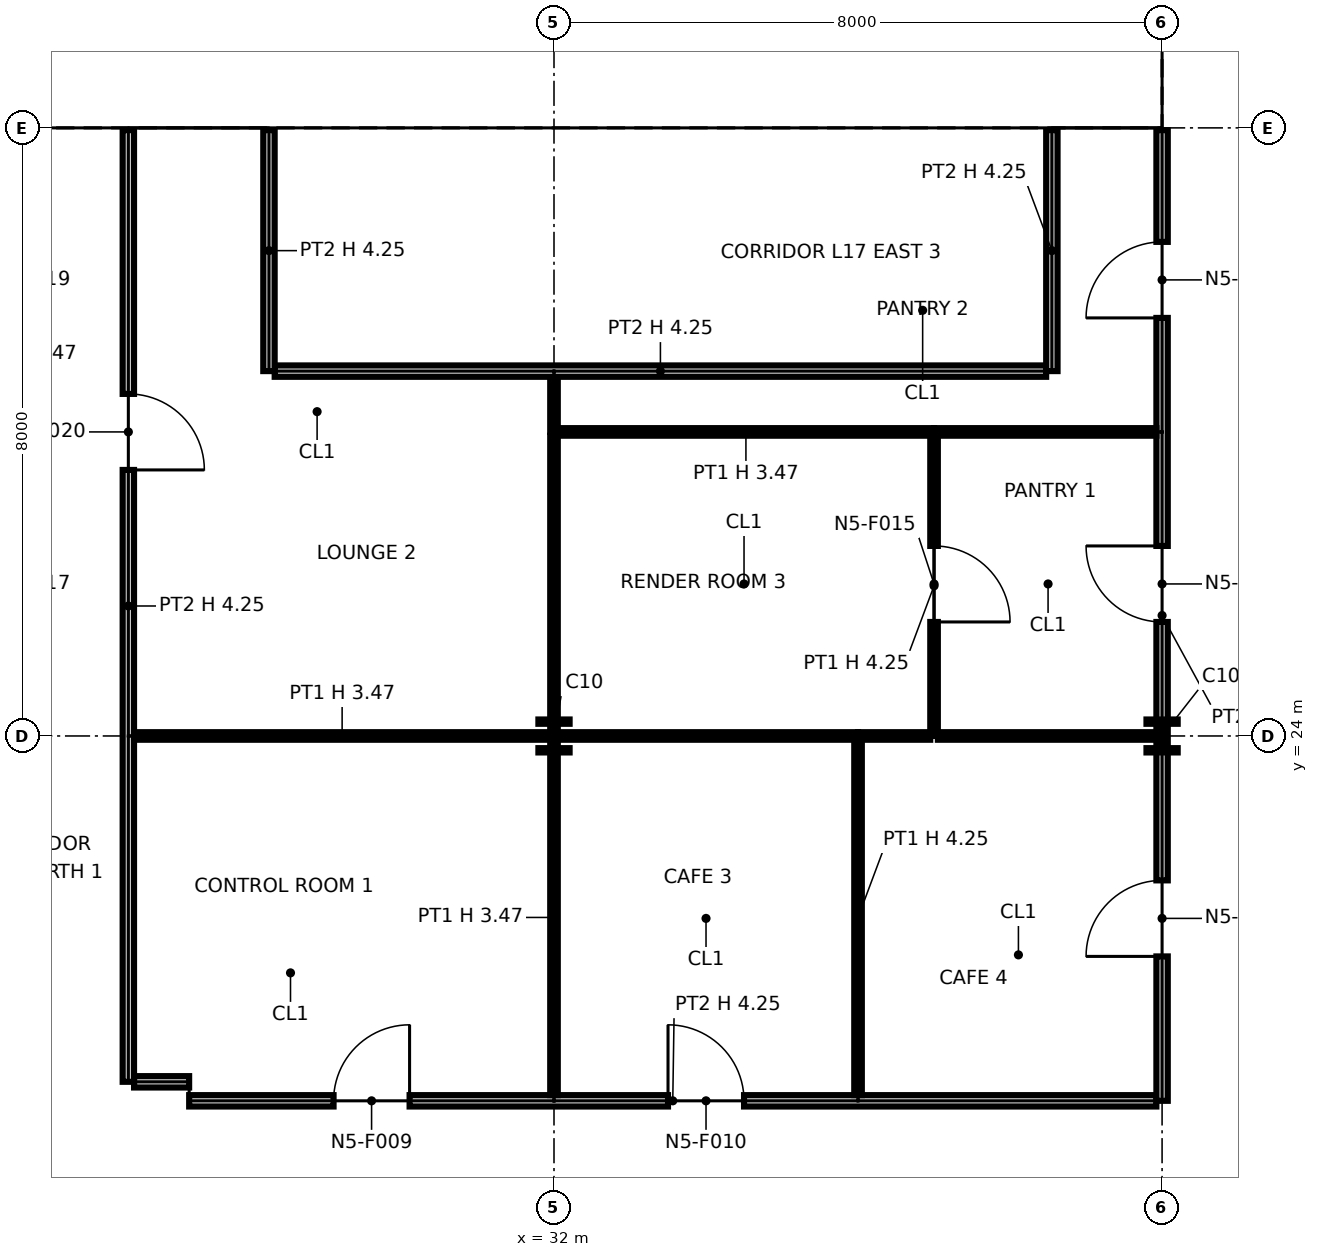
"""IFC4 building model, lengths in metres.
Left out: names, types, materials, properties, quantities, classifications, styles, units other than length and angle.
Written with IfcOpenShell. Run it as: python <this file> out.ifc"""

import sys

from ifc_helpers import new_model, si_unit, direction, frame, frame_2d, origin, origin_2d, place, context, subcontext, project, spatial, polyline, rectangle, i_section, outline, extrude, element, fill, save


model = new_model("IFC4")
c1 = context("Model", 3, precision=1e-05, world=origin(), true_north=direction((0.0, 1.0)))
c2 = subcontext(c1, "Body", "Model", "MODEL_VIEW")
j1 = project(units=[si_unit("LENGTHUNIT", "METRE"), si_unit("PLANEANGLEUNIT", "RADIAN")], contexts=[c1])
p1 = place(None, origin())
s1 = spatial("IfcSite", under=j1, at=p1, CompositionType="ELEMENT")
p2 = place(p1, origin())
s2 = spatial("IfcBuilding", under=s1, at=p2, CompositionType="ELEMENT")
p3 = place(p2, frame((0.0, 0.0, 92.0)))
s3 = spatial("IfcBuildingStorey", under=s2, at=p3, CompositionType="ELEMENT", Elevation=92.0)
p4 = place(p3, frame((32.0, 24.0, 0.0), z_axis=(0.0, 0.0, 1.0), x_axis=(1.0, 0.0, 0.0)))
e1 = element("IfcColumn", 1, at=p4, inside=s3, PredefinedType="COLUMN", context=c2, shape_type="SweptSolid", body=[
    extrude(i_section(OverallWidth=0.411, OverallDepth=0.434, WebThickness=0.036, FlangeThickness=0.057, at=origin_2d()), origin(), (0.0, 0.0, 1.0), 4.25),
])
p5 = place(p3, frame((32.0, 32.0, 0.0), z_axis=(0.0, 0.0, 1.0), x_axis=(1.0, 0.0, 0.0)))
e2 = element("IfcColumn", 2, at=p5, inside=s3, PredefinedType="COLUMN", context=c2, shape_type="SweptSolid", body=[
    extrude(i_section(OverallWidth=0.257, OverallDepth=0.363, WebThickness=0.013, FlangeThickness=0.022, at=origin_2d()), origin(), (0.0, 0.0, 1.0), 4.25),
])
p6 = place(p3, frame((40.0, 24.0, 0.0), z_axis=(0.0, 0.0, 1.0), x_axis=(1.0, 0.0, 0.0)))
e3 = element("IfcColumn", 3, at=p6, inside=s3, PredefinedType="COLUMN", context=c2, shape_type="SweptSolid", body=[
    extrude(i_section(OverallWidth=0.411, OverallDepth=0.434, WebThickness=0.036, FlangeThickness=0.057, at=origin_2d()), origin(), (0.0, 0.0, 1.0), 4.25),
])
p7 = place(p3, frame((40.0, 32.0, 0.0), z_axis=(0.0, 0.0, 1.0), x_axis=(1.0, 0.0, 0.0)))
e4 = element("IfcColumn", 4, at=p7, inside=s3, PredefinedType="COLUMN", context=c2, shape_type="SweptSolid", body=[
    extrude(i_section(OverallWidth=0.257, OverallDepth=0.363, WebThickness=0.013, FlangeThickness=0.022, at=origin_2d()), origin(), (0.0, 0.0, 1.0), 4.25),
])
p8 = place(p3, frame((24.65, 32.75, 0.0), z_axis=(0.0, 0.0, 1.0), x_axis=(1.0, 0.0, 0.0)))
e5 = element("IfcWall", 5, at=p8, inside=s3, PredefinedType="PARTITIONING", context=c2, shape_type="SweptSolid", body=[
    extrude(outline(polyline([(0.0, 0.0), (14.7, 0.0), (14.7, 4.25), (7.469, 4.25), (7.469, 3.632), (7.231, 3.632), (7.23, 4.25), (0.0, 4.25), (0.0, 0.0)])), frame((0.0, 0.1, 0.0), z_axis=(0.0, -1.0, 0.0), x_axis=(1.0, 0.0, 0.0)), (0.0, 0.0, 1.0), 0.2),
])
p9 = place(p8, frame((4.1, 0.0, 0.0)))
e6 = element("IfcOpeningElement", 6, at=p9, cuts=e5, PredefinedType="OPENING", context=c2, shape_type="SweptSolid", body=[
    extrude(rectangle(XDim=1.8, YDim=2.1, at=frame_2d((0.9, 1.05))), frame((0.0, 0.11, 0.0), z_axis=(0.0, -1.0, 0.0), x_axis=(1.0, 0.0, 0.0)), (0.0, 0.0, 1.0), 0.22),
])
p10 = place(p8, frame((8.55, 0.0, 0.0)))
e7 = element("IfcOpeningElement", 7, at=p10, cuts=e5, PredefinedType="OPENING", context=c2, shape_type="SweptSolid", body=[
    extrude(rectangle(XDim=1.4, YDim=2.1, at=frame_2d((0.7, 1.05))), frame((0.0, 0.11, 0.0), z_axis=(0.0, -1.0, 0.0), x_axis=(1.0, 0.0, 0.0)), (0.0, 0.0, 1.0), 0.22),
])
p11 = place(p8, frame((12.0, 0.0, 0.0)))
e8 = element("IfcOpeningElement", 8, at=p11, cuts=e5, PredefinedType="OPENING", context=c2, shape_type="SweptSolid", body=[
    extrude(rectangle(XDim=1.4, YDim=2.1, at=frame_2d((0.7, 1.05))), frame((0.0, 0.11, 0.0), z_axis=(0.0, -1.0, 0.0), x_axis=(1.0, 0.0, 0.0)), (0.0, 0.0, 1.0), 0.22),
])
p12 = place(p3, frame((26.875, 32.85, 0.0), z_axis=(0.0, 0.0, 1.0), x_axis=(0.0, 1.0, 0.0)))
e9 = element("IfcWall", 9, at=p12, inside=s3, PredefinedType="PARTITIONING", context=c2, shape_type="SweptSolid", body=[
    extrude(rectangle(XDim=2.15, YDim=0.15, at=frame_2d((1.075, 0.0))), origin(), (0.0, 0.0, 1.0), 4.25),
])
p13 = place(p12, frame((0.6, 0.0, 0.0)))
e10 = element("IfcOpeningElement", 10, at=p13, cuts=e9, PredefinedType="OPENING", context=c2, shape_type="SweptSolid", body=[
    extrude(rectangle(XDim=0.9, YDim=2.1, at=frame_2d((0.45, 1.05))), frame((0.0, 0.085, 0.0), z_axis=(0.0, -1.0, 0.0), x_axis=(1.0, 0.0, 0.0)), (0.0, 0.0, 1.0), 0.17),
])
p14 = place(p3, frame((32.0, 32.85, 0.0), z_axis=(0.0, 0.0, 1.0), x_axis=(0.0, 1.0, 0.0)))
e11 = element("IfcWall", 11, at=p14, inside=s3, PredefinedType="PARTITIONING", context=c2, shape_type="SweptSolid", body=[
    extrude(rectangle(XDim=6.3, YDim=0.6, at=frame_2d((3.15, 0.0))), origin(), (0.0, 0.0, 1.0), 3.632),
])
for number, where, z_axis, x_axis in (
    (12, (35.6, 32.85, 0.0), (0.0, 0.0, 1.0), (0.0, 1.0, 0.0)),
    (13, (39.25, 32.85, 0.0), (0.0, 0.0, 1.0), (0.0, 1.0, 0.0)),
):
    element("IfcWall", number, at=place(p3, frame(where, z_axis=z_axis, x_axis=x_axis)), inside=s3, PredefinedType="PARTITIONING", context=c2, shape_type="SweptSolid", body=[
        extrude(rectangle(XDim=6.3, YDim=0.2, at=frame_2d((3.15, 0.0))), origin(), (0.0, 0.0, 1.0), 4.25),
    ])
p15 = place(p3, frame((27.2, 19.2, 0.0), z_axis=(0.0, 0.0, 1.0), x_axis=(1.0, 0.0, 0.0)))
e14 = element("IfcWall", 14, at=p15, inside=s3, PredefinedType="PARTITIONING", context=c2, shape_type="SweptSolid", body=[
    extrude(rectangle(XDim=12.725, YDim=0.15, at=frame_2d((6.363, 0.0))), origin(), (0.0, 0.0, 1.0), 4.25),
])
p16 = place(p15, frame((1.9, 0.0, 0.0)))
e15 = element("IfcOpeningElement", 15, at=p16, cuts=e14, PredefinedType="OPENING", context=c2, shape_type="SweptSolid", body=[
    extrude(rectangle(XDim=1.0, YDim=2.1, at=frame_2d((0.5, 1.05))), frame((0.0, 0.085, 0.0), z_axis=(0.0, -1.0, 0.0), x_axis=(1.0, 0.0, 0.0)), (0.0, 0.0, 1.0), 0.17),
])
p17 = place(p15, frame((6.3, 0.0, 0.0)))
e16 = element("IfcOpeningElement", 16, at=p17, cuts=e14, PredefinedType="OPENING", context=c2, shape_type="SweptSolid", body=[
    extrude(rectangle(XDim=1.0, YDim=2.1, at=frame_2d((0.5, 1.05))), frame((0.0, 0.085, 0.0), z_axis=(0.0, -1.0, 0.0), x_axis=(1.0, 0.0, 0.0)), (0.0, 0.0, 1.0), 0.17),
])
p18 = place(p3, frame((32.0, 19.275, 0.0), z_axis=(0.0, 0.0, 1.0), x_axis=(0.0, 1.0, 0.0)))
e17 = element("IfcWall", 17, at=p18, inside=s3, PredefinedType="PARTITIONING", context=c2, shape_type="SweptSolid", body=[
    extrude(rectangle(XDim=4.675, YDim=0.1, at=frame_2d((2.337, 0.0))), origin(), (0.0, 0.0, 1.0), 3.47),
])
p19 = place(p3, frame((36.0, 19.275, 0.0), z_axis=(0.0, 0.0, 1.0), x_axis=(0.0, 1.0, 0.0)))
e18 = element("IfcWall", 18, at=p19, inside=s3, PredefinedType="PARTITIONING", context=c2, shape_type="SweptSolid", body=[
    extrude(outline(polyline([(0.0, 0.0), (4.675, 0.0), (4.675, 4.25), (1.025, 4.25), (1.023, 3.47), (0.427, 3.47), (0.425, 4.25), (0.0, 4.25), (0.0, 0.0)])), frame((0.0, 0.05, 0.0), z_axis=(0.0, -1.0, 0.0), x_axis=(1.0, 0.0, 0.0)), (0.0, 0.0, 1.0), 0.1),
])
p20 = place(p3, frame((40.0, 19.2, 0.0), z_axis=(0.0, 0.0, 1.0), x_axis=(0.0, 1.0, 0.0)))
e19 = element("IfcWall", 19, at=p20, inside=s3, PredefinedType="PARTITIONING", context=c2, shape_type="SweptSolid", body=[
    extrude(rectangle(XDim=12.77, YDim=0.15, at=frame_2d((6.385, 0.0))), origin(), (0.0, 0.0, 1.0), 3.47),
])
p21 = place(p20, frame((1.9, 0.0, 0.0)))
e20 = element("IfcOpeningElement", 20, at=p21, cuts=e19, PredefinedType="OPENING", context=c2, shape_type="SweptSolid", body=[
    extrude(rectangle(XDim=1.0, YDim=2.1, at=frame_2d((0.5, 1.05))), frame((0.0, 0.085, 0.0), z_axis=(0.0, -1.0, 0.0), x_axis=(1.0, 0.0, 0.0)), (0.0, 0.0, 1.0), 0.17),
])
p22 = place(p20, frame((6.3, 0.0, 0.0)))
e21 = element("IfcOpeningElement", 21, at=p22, cuts=e19, PredefinedType="OPENING", context=c2, shape_type="SweptSolid", body=[
    extrude(rectangle(XDim=1.0, YDim=2.1, at=frame_2d((0.5, 1.05))), frame((0.0, 0.085, 0.0), z_axis=(0.0, -1.0, 0.0), x_axis=(1.0, 0.0, 0.0)), (0.0, 0.0, 1.0), 0.17),
])
p23 = place(p20, frame((10.3, 0.0, 0.0)))
e22 = element("IfcOpeningElement", 22, at=p23, cuts=e19, PredefinedType="OPENING", context=c2, shape_type="SweptSolid", body=[
    extrude(rectangle(XDim=1.0, YDim=2.1, at=frame_2d((0.5, 1.05))), frame((0.0, 0.085, 0.0), z_axis=(0.0, -1.0, 0.0), x_axis=(1.0, 0.0, 0.0)), (0.0, 0.0, 1.0), 0.17),
])
p24 = place(p3, frame((26.475, 19.45, 0.0), z_axis=(0.0, 0.0, 1.0), x_axis=(1.0, 0.0, 0.0)))
e23 = element("IfcWall", 23, at=p24, inside=s3, PredefinedType="PARTITIONING", context=c2, shape_type="SweptSolid", body=[
    extrude(rectangle(XDim=0.725, YDim=0.15, at=frame_2d((0.362, 0.0))), origin(), (0.0, 0.0, 1.0), 4.25),
])
p25 = place(p3, frame((26.4, 19.45, 0.0), z_axis=(0.0, 0.0, 1.0), x_axis=(0.0, 1.0, 0.0)))
e24 = element("IfcWall", 24, at=p25, inside=s3, PredefinedType="PARTITIONING", context=c2, shape_type="SweptSolid", body=[
    extrude(outline(polyline([(0.0, 0.0), (12.52, 0.0), (12.52, 4.25), (8.85, 4.25), (8.848, 3.47), (8.252, 3.47), (8.25, 4.25), (4.85, 4.25), (4.848, 3.47), (4.252, 3.47), (4.25, 4.25), (0.85, 4.25), (0.848, 3.47), (0.252, 3.47), (0.25, 4.25), (0.0, 4.25), (0.0, 0.0)])), frame((0.0, 0.075, 0.0), z_axis=(0.0, -1.0, 0.0), x_axis=(1.0, 0.0, 0.0)), (0.0, 0.0, 1.0), 0.15),
])
p26 = place(p25, frame((9.05, 0.0, 0.0), z_axis=(0.0, 0.0, 1.0), x_axis=(-1.0, 0.0, 0.0)))
e25 = element("IfcOpeningElement", 25, at=p26, cuts=e24, PredefinedType="OPENING", context=c2, shape_type="SweptSolid", body=[
    extrude(rectangle(XDim=1.0, YDim=2.1, at=frame_2d((0.5, 1.05))), frame((0.0, 0.085, 0.0), z_axis=(0.0, -1.0, 0.0), x_axis=(1.0, 0.0, 0.0)), (0.0, 0.0, 1.0), 0.17),
])
p27 = place(p3, frame((26.475, 24.0, 0.0), z_axis=(0.0, 0.0, 1.0), x_axis=(1.0, 0.0, 0.0)))
e26 = element("IfcWall", 26, at=p27, inside=s3, PredefinedType="PARTITIONING", context=c2, shape_type="SweptSolid", body=[
    extrude(rectangle(XDim=5.475, YDim=0.1, at=frame_2d((2.737, 0.0))), origin(), (0.0, 0.0, 1.0), 3.47),
])
for number, where, z_axis, x_axis in (
    (27, (32.05, 24.0, 0.0), (0.0, 0.0, 1.0), (1.0, 0.0, 0.0)),
    (28, (32.0, 24.0, 0.0), (0.0, 0.0, 1.0), (0.0, 1.0, 0.0)),
):
    element("IfcWall", number, at=place(p3, frame(where, z_axis=z_axis, x_axis=x_axis)), inside=s3, PredefinedType="PARTITIONING", context=c2, shape_type="SweptSolid", body=[
        extrude(rectangle(XDim=3.95, YDim=0.1, at=frame_2d((1.975, 0.0))), origin(), (0.0, 0.0, 1.0), 3.47),
    ])
p28 = place(p3, frame((36.0, 24.0, 0.0), z_axis=(0.0, 0.0, 1.0), x_axis=(1.0, 0.0, 0.0)))
e29 = element("IfcWall", 29, at=p28, inside=s3, PredefinedType="PARTITIONING", context=c2, shape_type="SweptSolid", body=[
    extrude(rectangle(XDim=0.95, YDim=0.1, at=frame_2d((0.475, 0.0))), origin(), (0.0, 0.0, 1.0), 3.47),
])
p29 = place(p3, frame((37.05, 24.0, 0.0), z_axis=(0.0, 0.0, 1.0), x_axis=(1.0, 0.0, 0.0)))
e30 = element("IfcWall", 30, at=p29, inside=s3, PredefinedType="PARTITIONING", context=c2, shape_type="SweptSolid", body=[
    extrude(rectangle(XDim=2.875, YDim=0.1, at=frame_2d((1.438, 0.0))), origin(), (0.0, 0.0, 1.0), 3.47),
])
p30 = place(p3, frame((37.0, 24.0, 0.0), z_axis=(0.0, 0.0, 1.0), x_axis=(0.0, 1.0, 0.0)))
e31 = element("IfcWall", 31, at=p30, inside=s3, PredefinedType="PARTITIONING", context=c2, shape_type="SweptSolid", body=[
    extrude(rectangle(XDim=3.95, YDim=0.1, at=frame_2d((1.975, 0.0))), origin(), (0.0, 0.0, 1.0), 4.25),
])
p31 = place(p30, frame((2.5, 0.0, 0.0), z_axis=(0.0, 0.0, 1.0), x_axis=(-1.0, 0.0, 0.0)))
e32 = element("IfcOpeningElement", 32, at=p31, cuts=e31, PredefinedType="OPENING", context=c2, shape_type="SweptSolid", body=[
    extrude(rectangle(XDim=1.0, YDim=2.1, at=frame_2d((0.5, 1.05))), frame((0.0, 0.06, 0.0), z_axis=(0.0, -1.0, 0.0), x_axis=(1.0, 0.0, 0.0)), (0.0, 0.0, 1.0), 0.12),
])
p32 = place(p3, frame((32.05, 28.0, 0.0), z_axis=(0.0, 0.0, 1.0), x_axis=(1.0, 0.0, 0.0)))
e33 = element("IfcWall", 33, at=p32, inside=s3, PredefinedType="PARTITIONING", context=c2, shape_type="SweptSolid", body=[
    extrude(rectangle(XDim=4.95, YDim=0.1, at=frame_2d((2.475, 0.0))), origin(), (0.0, 0.0, 1.0), 3.47),
])
p33 = place(p3, frame((32.0, 28.0, 0.0), z_axis=(0.0, 0.0, 1.0), x_axis=(0.0, 1.0, 0.0)))
e34 = element("IfcWall", 34, at=p33, inside=s3, PredefinedType="PARTITIONING", context=c2, shape_type="SweptSolid", body=[
    extrude(rectangle(XDim=0.725, YDim=0.1, at=frame_2d((0.363, 0.0))), origin(), (0.0, 0.0, 1.0), 3.47),
])
p34 = place(p3, frame((37.0, 28.0, 0.0), z_axis=(0.0, 0.0, 1.0), x_axis=(1.0, 0.0, 0.0)))
e35 = element("IfcWall", 35, at=p34, inside=s3, PredefinedType="PARTITIONING", context=c2, shape_type="SweptSolid", body=[
    extrude(rectangle(XDim=2.925, YDim=0.1, at=frame_2d((1.462, 0.0))), origin(), (0.0, 0.0, 1.0), 3.47),
])
p35 = place(p3, frame((28.325, 28.8, 0.0), z_axis=(0.0, 0.0, 1.0), x_axis=(1.0, 0.0, 0.0)))
e36 = element("IfcWall", 36, at=p35, inside=s3, PredefinedType="PARTITIONING", context=c2, shape_type="SweptSolid", body=[
    extrude(rectangle(XDim=10.15, YDim=0.15, at=frame_2d((5.075, 0.0))), origin(), (0.0, 0.0, 1.0), 4.25),
])
for number, where, z_axis, x_axis in (
    (37, (28.25, 28.8, 0.0), (0.0, 0.0, 1.0), (0.0, 1.0, 0.0)),
    (38, (38.55, 28.8, 0.0), (0.0, 0.0, 1.0), (0.0, 1.0, 0.0)),
):
    element("IfcWall", number, at=place(p3, frame(where, z_axis=z_axis, x_axis=x_axis)), inside=s3, PredefinedType="PARTITIONING", context=c2, shape_type="SweptSolid", body=[
        extrude(rectangle(XDim=3.17, YDim=0.15, at=frame_2d((1.585, 0.0))), origin(), (0.0, 0.0, 1.0), 4.25),
    ])
p36 = place(p9, origin())
e39 = element("IfcDoor", 39, at=p36, inside=s3, OperationType="DOUBLE_DOOR_SINGLE_SWING", PredefinedType="NOTDEFINED", context=c2, shape_type="SweptSolid", body=[
    extrude(rectangle(XDim=1.8, YDim=2.1, at=frame_2d((0.9, 1.05))), frame((0.0, 0.025, 0.0), z_axis=(0.0, -1.0, 0.0), x_axis=(1.0, 0.0, 0.0)), (0.0, 0.0, 1.0), 0.05),
])
fill(e6, e39)
p37 = place(p10, origin())
e40 = element("IfcDoor", 40, at=p37, inside=s3, OperationType="DOUBLE_DOOR_SINGLE_SWING", PredefinedType="NOTDEFINED", context=c2, shape_type="SweptSolid", body=[
    extrude(rectangle(XDim=1.4, YDim=2.1, at=frame_2d((0.7, 1.05))), frame((0.0, 0.025, 0.0), z_axis=(0.0, -1.0, 0.0), x_axis=(1.0, 0.0, 0.0)), (0.0, 0.0, 1.0), 0.05),
])
fill(e7, e40)
p38 = place(p11, origin())
e41 = element("IfcDoor", 41, at=p38, inside=s3, OperationType="DOUBLE_DOOR_SINGLE_SWING", PredefinedType="NOTDEFINED", context=c2, shape_type="SweptSolid", body=[
    extrude(rectangle(XDim=1.4, YDim=2.1, at=frame_2d((0.7, 1.05))), frame((0.0, 0.025, 0.0), z_axis=(0.0, -1.0, 0.0), x_axis=(1.0, 0.0, 0.0)), (0.0, 0.0, 1.0), 0.05),
])
fill(e8, e41)
p39 = place(p16, origin())
e42 = element("IfcDoor", 42, at=p39, inside=s3, OperationType="SINGLE_SWING_RIGHT", PredefinedType="DOOR", context=c2, shape_type="SweptSolid", body=[
    extrude(rectangle(XDim=1.0, YDim=2.1, at=frame_2d((0.5, 1.05))), frame((0.0, 0.025, 0.0), z_axis=(0.0, -1.0, 0.0), x_axis=(1.0, 0.0, 0.0)), (0.0, 0.0, 1.0), 0.05),
])
fill(e15, e42)
p40 = place(p17, origin())
e43 = element("IfcDoor", 43, at=p40, inside=s3, OperationType="SINGLE_SWING_LEFT", PredefinedType="DOOR", context=c2, shape_type="SweptSolid", body=[
    extrude(rectangle(XDim=1.0, YDim=2.1, at=frame_2d((0.5, 1.05))), frame((0.0, 0.025, 0.0), z_axis=(0.0, -1.0, 0.0), x_axis=(1.0, 0.0, 0.0)), (0.0, 0.0, 1.0), 0.05),
])
fill(e16, e43)
p41 = place(p21, origin())
e44 = element("IfcDoor", 44, at=p41, inside=s3, OperationType="SINGLE_SWING_LEFT", PredefinedType="DOOR", context=c2, shape_type="SweptSolid", body=[
    extrude(rectangle(XDim=1.0, YDim=2.1, at=frame_2d((0.5, 1.05))), frame((0.0, 0.025, 0.0), z_axis=(0.0, -1.0, 0.0), x_axis=(1.0, 0.0, 0.0)), (0.0, 0.0, 1.0), 0.05),
])
fill(e20, e44)
p42 = place(p22, origin())
e45 = element("IfcDoor", 45, at=p42, inside=s3, OperationType="SINGLE_SWING_RIGHT", PredefinedType="DOOR", context=c2, shape_type="SweptSolid", body=[
    extrude(rectangle(XDim=1.0, YDim=2.1, at=frame_2d((0.5, 1.05))), frame((0.0, 0.025, 0.0), z_axis=(0.0, -1.0, 0.0), x_axis=(1.0, 0.0, 0.0)), (0.0, 0.0, 1.0), 0.05),
])
fill(e21, e45)
p43 = place(p31, origin())
e46 = element("IfcDoor", 46, at=p43, inside=s3, OperationType="SINGLE_SWING_RIGHT", PredefinedType="DOOR", context=c2, shape_type="SweptSolid", body=[
    extrude(rectangle(XDim=1.0, YDim=2.1, at=frame_2d((0.5, 1.05))), frame((0.0, 0.025, 0.0), z_axis=(0.0, -1.0, 0.0), x_axis=(1.0, 0.0, 0.0)), (0.0, 0.0, 1.0), 0.05),
])
fill(e32, e46)
p44 = place(p23, origin())
e47 = element("IfcDoor", 47, at=p44, inside=s3, OperationType="SINGLE_SWING_LEFT", PredefinedType="DOOR", context=c2, shape_type="SweptSolid", body=[
    extrude(rectangle(XDim=1.0, YDim=2.1, at=frame_2d((0.5, 1.05))), frame((0.0, 0.025, 0.0), z_axis=(0.0, -1.0, 0.0), x_axis=(1.0, 0.0, 0.0)), (0.0, 0.0, 1.0), 0.05),
])
fill(e22, e47)
p45 = place(p26, origin())
e48 = element("IfcDoor", 48, at=p45, inside=s3, OperationType="SINGLE_SWING_RIGHT", PredefinedType="DOOR", context=c2, shape_type="SweptSolid", body=[
    extrude(rectangle(XDim=1.0, YDim=2.1, at=frame_2d((0.5, 1.05))), frame((0.0, 0.025, 0.0), z_axis=(0.0, -1.0, 0.0), x_axis=(1.0, 0.0, 0.0)), (0.0, 0.0, 1.0), 0.05),
])
fill(e25, e48)
save(model, sys.argv[1])
